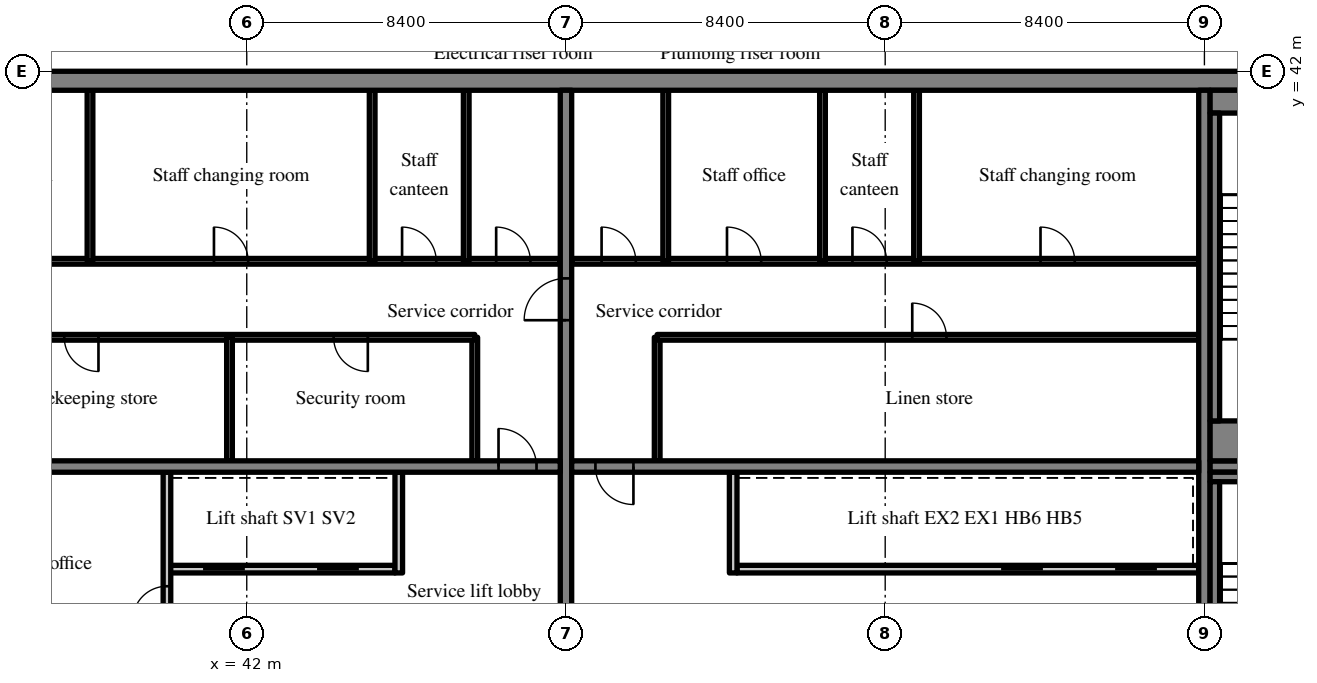
"""IFC4 building model, lengths in metres.
Left out: names, types, materials, properties, quantities, classifications, styles, units other than length and angle.
Written with IfcOpenShell. Run it as: python <this file> out.ifc"""

import sys

from ifc_helpers import new_model, si_unit, direction, frame, frame_2d, origin, place, context, subcontext, project, spatial, rectangle, extrude, source, transform, mapped, element, fill, save


model = new_model("IFC4")
c1 = context("Model", 3, precision=1e-05, world=origin(), true_north=direction((0.0, 1.0)))
c2 = subcontext(c1, "Body", "Model", "MODEL_VIEW")
j1 = project(units=[si_unit("LENGTHUNIT", "METRE"), si_unit("PLANEANGLEUNIT", "RADIAN")], contexts=[c1])
p1 = place(None, origin())
s1 = spatial("IfcSite", under=j1, at=p1, CompositionType="ELEMENT")
p2 = place(p1, origin())
s2 = spatial("IfcBuilding", under=s1, at=p2, CompositionType="ELEMENT")
p3 = place(p2, frame((0.0, 0.0, 301.7)))
s3 = spatial("IfcBuildingStorey", under=s2, at=p3, CompositionType="ELEMENT", Elevation=301.7)
m1 = source(origin(), c2, "Body", "SweptSolid", [
    extrude(rectangle(XDim=50.4, YDim=0.5, at=frame_2d((25.2, 0.0))), origin(), (0.0, 0.0, 1.0), 3.72),
])
p4 = place(p3, frame((25.2, 41.75, 0.0), z_axis=(0.0, 0.0, 1.0), x_axis=(1.0, 0.0, 0.0)))
e1 = element("IfcWall", 1, at=p4, inside=s3, PredefinedType="SHEAR", context=c2, shape_type="MappedRepresentation", body=[
    mapped(m1, transform((0.0, 0.0, 0.0), scale=1.0)),
])
m2 = source(origin(), c2, "Body", "SweptSolid", [
    extrude(rectangle(XDim=19.0, YDim=0.3, at=frame_2d((9.5, 0.0))), origin(), (0.0, 0.0, 1.0), 3.72),
])
p5 = place(p3, frame((50.4, 22.5, 0.0), z_axis=(0.0, 0.0, 1.0), x_axis=(0.0, 1.0, 0.0)))
e2 = element("IfcWall", 2, at=p5, inside=s3, PredefinedType="SHEAR", context=c2, shape_type="MappedRepresentation", body=[
    mapped(m2, transform((0.0, 0.0, 0.0), scale=1.0)),
])
m3 = source(origin(), c2, "Body", "SweptSolid", [
    extrude(rectangle(XDim=1.1, YDim=2.1, at=frame_2d((0.55, 1.05))), frame((0.0, 0.16, 0.0), z_axis=(0.0, -1.0, 0.0), x_axis=(1.0, 0.0, 0.0)), (0.0, 0.0, 1.0), 0.32),
])
p6 = place(p5, frame((12.95, 0.0, 0.0)))
e3 = element("IfcOpeningElement", 3, at=p6, cuts=e2, PredefinedType="OPENING", context=c2, shape_type="MappedRepresentation", body=[
    mapped(m3, transform((0.0, 0.0, 0.0), scale=1.0)),
])
p7 = place(p3, frame((67.2, 22.5, 0.0), z_axis=(0.0, 0.0, 1.0), x_axis=(0.0, 1.0, 0.0)))
e4 = element("IfcWall", 4, at=p7, inside=s3, PredefinedType="SHEAR", context=c2, shape_type="MappedRepresentation", body=[
    mapped(m2, transform((0.0, 0.0, 0.0), scale=1.0)),
])
m4 = source(origin(), c2, "Body", "SweptSolid", [
    extrude(rectangle(XDim=16.5, YDim=0.3, at=frame_2d((8.25, 0.0))), origin(), (0.0, 0.0, 1.0), 3.72),
])
p8 = place(p3, frame((33.75, 31.6, 0.0), z_axis=(0.0, 0.0, 1.0), x_axis=(1.0, 0.0, 0.0)))
e5 = element("IfcWall", 5, at=p8, inside=s3, PredefinedType="SHEAR", context=c2, shape_type="MappedRepresentation", body=[
    mapped(m4, transform((0.0, 0.0, 0.0), scale=1.0)),
])
m5 = source(origin(), c2, "Body", "SweptSolid", [
    extrude(rectangle(XDim=1.0, YDim=2.1, at=frame_2d((0.5, 1.05))), frame((0.0, 0.16, 0.0), z_axis=(0.0, -1.0, 0.0), x_axis=(1.0, 0.0, 0.0)), (0.0, 0.0, 1.0), 0.32),
])
p9 = place(p8, frame((14.875, 0.0, 0.0)))
e6 = element("IfcOpeningElement", 6, at=p9, cuts=e5, PredefinedType="OPENING", context=c2, shape_type="MappedRepresentation", body=[
    mapped(m5, transform((0.0, 0.0, 0.0), scale=1.0)),
])
p10 = place(p3, frame((50.55, 31.6, 0.0), z_axis=(0.0, 0.0, 1.0), x_axis=(1.0, 0.0, 0.0)))
e7 = element("IfcWall", 7, at=p10, inside=s3, PredefinedType="SHEAR", context=c2, shape_type="MappedRepresentation", body=[
    mapped(m4, transform((0.0, 0.0, 0.0), scale=1.0)),
])
p11 = place(p10, frame((0.625, 0.0, 0.0)))
e8 = element("IfcOpeningElement", 8, at=p11, cuts=e7, PredefinedType="OPENING", context=c2, shape_type="MappedRepresentation", body=[
    mapped(m5, transform((0.0, 0.0, 0.0), scale=1.0)),
])
m6 = source(origin(), c2, "Body", "SweptSolid", [
    extrude(rectangle(XDim=7.75, YDim=0.3, at=frame_2d((3.875, 0.0))), origin(), (0.0, 0.0, 1.0), 3.72),
])
p12 = place(p3, frame((67.35, 31.6, 0.0), z_axis=(0.0, 0.0, 1.0), x_axis=(1.0, 0.0, 0.0)))
e9 = element("IfcWall", 9, at=p12, inside=s3, PredefinedType="SHEAR", context=c2, shape_type="MappedRepresentation", body=[
    mapped(m6, transform((0.0, 0.0, 0.0), scale=1.0)),
])
p13 = place(p12, frame((5.875, 0.0, 0.0)))
e10 = element("IfcOpeningElement", 10, at=p13, cuts=e9, PredefinedType="OPENING", context=c2, shape_type="MappedRepresentation", body=[
    mapped(m3, transform((0.0, 0.0, 0.0), scale=1.0)),
])
m7 = source(origin(), c2, "Body", "SweptSolid", [
    extrude(rectangle(XDim=6.0, YDim=0.2, at=frame_2d((3.0, 0.0))), origin(), (0.0, 0.0, 1.0), 3.72),
])
p14 = place(p3, frame((39.9, 28.9, 0.0), z_axis=(0.0, 0.0, 1.0), x_axis=(1.0, 0.0, 0.0)))
e11 = element("IfcWall", 11, at=p14, inside=s3, PredefinedType="SOLIDWALL", context=c2, shape_type="MappedRepresentation", body=[
    mapped(m7, transform((0.0, 0.0, 0.0), scale=1.0)),
])
m8 = source(origin(), c2, "Body", "SweptSolid", [
    extrude(rectangle(XDim=1.1, YDim=2.1, at=frame_2d((0.55, 1.05))), frame((0.0, 0.11, 0.0), z_axis=(0.0, -1.0, 0.0), x_axis=(1.0, 0.0, 0.0)), (0.0, 0.0, 1.0), 0.22),
])
p15 = place(p14, frame((0.95, 0.0, 0.0)))
e12 = element("IfcOpeningElement", 12, at=p15, cuts=e11, PredefinedType="OPENING", context=c2, shape_type="MappedRepresentation", body=[
    mapped(m8, transform((0.0, 0.0, 0.0), scale=1.0)),
])
p16 = place(p14, frame((3.95, 0.0, 0.0)))
e13 = element("IfcOpeningElement", 13, at=p16, cuts=e11, PredefinedType="OPENING", context=c2, shape_type="MappedRepresentation", body=[
    mapped(m8, transform((0.0, 0.0, 0.0), scale=1.0)),
])
m9 = source(origin(), c2, "Body", "SweptSolid", [
    extrude(rectangle(XDim=8.95, YDim=0.2, at=frame_2d((4.475, 0.0))), origin(), (0.0, 0.0, 1.0), 3.72),
])
p17 = place(p3, frame((39.9, 22.5, 0.0), z_axis=(0.0, 0.0, 1.0), x_axis=(0.0, 1.0, 0.0)))
e14 = element("IfcWall", 14, at=p17, inside=s3, PredefinedType="PARTITIONING", context=c2, shape_type="MappedRepresentation", body=[
    mapped(m9, transform((0.0, 0.0, 0.0), scale=1.0)),
])
m10 = source(origin(), c2, "Body", "SweptSolid", [
    extrude(rectangle(XDim=0.9, YDim=2.1, at=frame_2d((0.45, 1.05))), frame((0.0, 0.11, 0.0), z_axis=(0.0, -1.0, 0.0), x_axis=(1.0, 0.0, 0.0)), (0.0, 0.0, 1.0), 0.22),
])
p18 = place(p17, frame((5.05, 0.0, 0.0)))
e15 = element("IfcOpeningElement", 15, at=p18, cuts=e14, PredefinedType="OPENING", context=c2, shape_type="MappedRepresentation", body=[
    mapped(m10, transform((0.0, 0.0, 0.0), scale=1.0)),
])
m11 = source(origin(), c2, "Body", "SweptSolid", [
    extrude(rectangle(XDim=2.65, YDim=0.2, at=frame_2d((1.325, 0.0))), origin(), (0.0, 0.0, 1.0), 3.72),
])
p19 = place(p3, frame((46.0, 28.8, 0.0), z_axis=(0.0, 0.0, 1.0), x_axis=(0.0, 1.0, 0.0)))
e16 = element("IfcWall", 16, at=p19, inside=s3, PredefinedType="SOLIDWALL", context=c2, shape_type="MappedRepresentation", body=[
    mapped(m11, transform((0.0, 0.0, 0.0), scale=1.0)),
])
m12 = source(origin(), c2, "Body", "SweptSolid", [
    extrude(rectangle(XDim=3.25, YDim=0.15, at=frame_2d((1.625, 0.0))), origin(), (0.0, 0.0, 1.0), 3.72),
])
p20 = place(p3, frame((48.0, 31.75, 0.0), z_axis=(0.0, 0.0, 1.0), x_axis=(0.0, 1.0, 0.0)))
e17 = element("IfcWall", 17, at=p20, inside=s3, PredefinedType="PARTITIONING", context=c2, shape_type="MappedRepresentation", body=[
    mapped(m12, transform((0.0, 0.0, 0.0), scale=1.0)),
])
m13 = source(origin(), c2, "Body", "SweptSolid", [
    extrude(rectangle(XDim=14.25, YDim=0.15, at=frame_2d((7.125, 0.0))), origin(), (0.0, 0.0, 1.0), 3.72),
])
p21 = place(p3, frame((33.75, 35.0, 0.0), z_axis=(0.0, 0.0, 1.0), x_axis=(1.0, 0.0, 0.0)))
e18 = element("IfcWall", 18, at=p21, inside=s3, PredefinedType="PARTITIONING", context=c2, shape_type="MappedRepresentation", body=[
    mapped(m13, transform((0.0, 0.0, 0.0), scale=1.0)),
])
m14 = source(origin(), c2, "Body", "SweptSolid", [
    extrude(rectangle(XDim=0.9, YDim=2.1, at=frame_2d((0.45, 1.05))), frame((0.0, 0.085, 0.0), z_axis=(0.0, -1.0, 0.0), x_axis=(1.0, 0.0, 0.0)), (0.0, 0.0, 1.0), 0.17),
])
p22 = place(p21, frame((3.448, 0.0, 0.0)))
e19 = element("IfcOpeningElement", 19, at=p22, cuts=e18, PredefinedType="OPENING", context=c2, shape_type="MappedRepresentation", body=[
    mapped(m14, transform((0.0, 0.0, 0.0), scale=1.0)),
])
p23 = place(p21, frame((10.536, 0.0, 0.0)))
e20 = element("IfcOpeningElement", 20, at=p23, cuts=e18, PredefinedType="OPENING", context=c2, shape_type="MappedRepresentation", body=[
    mapped(m14, transform((0.0, 0.0, 0.0), scale=1.0)),
])
m15 = source(origin(), c2, "Body", "SweptSolid", [
    extrude(rectangle(XDim=16.5, YDim=0.15, at=frame_2d((8.25, 0.0))), origin(), (0.0, 0.0, 1.0), 3.72),
])
p24 = place(p3, frame((33.75, 37.0, 0.0), z_axis=(0.0, 0.0, 1.0), x_axis=(1.0, 0.0, 0.0)))
e21 = element("IfcWall", 21, at=p24, inside=s3, PredefinedType="PARTITIONING", context=c2, shape_type="MappedRepresentation", body=[
    mapped(m15, transform((0.0, 0.0, 0.0), scale=1.0)),
])
p25 = place(p24, frame((1.612, 0.0, 0.0)))
e22 = element("IfcOpeningElement", 22, at=p25, cuts=e21, PredefinedType="OPENING", context=c2, shape_type="MappedRepresentation", body=[
    mapped(m14, transform((0.0, 0.0, 0.0), scale=1.0)),
])
p26 = place(p24, frame((7.387, 0.0, 0.0)))
e23 = element("IfcOpeningElement", 23, at=p26, cuts=e21, PredefinedType="OPENING", context=c2, shape_type="MappedRepresentation", body=[
    mapped(m14, transform((0.0, 0.0, 0.0), scale=1.0)),
])
p27 = place(p24, frame((12.337, 0.0, 0.0)))
e24 = element("IfcOpeningElement", 24, at=p27, cuts=e21, PredefinedType="OPENING", context=c2, shape_type="MappedRepresentation", body=[
    mapped(m14, transform((0.0, 0.0, 0.0), scale=1.0)),
])
p28 = place(p24, frame((14.813, 0.0, 0.0)))
e25 = element("IfcOpeningElement", 25, at=p28, cuts=e21, PredefinedType="OPENING", context=c2, shape_type="MappedRepresentation", body=[
    mapped(m14, transform((0.0, 0.0, 0.0), scale=1.0)),
])
p29 = place(p3, frame((41.546, 31.75, 0.0), z_axis=(0.0, 0.0, 1.0), x_axis=(0.0, 1.0, 0.0)))
e26 = element("IfcWall", 26, at=p29, inside=s3, PredefinedType="PARTITIONING", context=c2, shape_type="MappedRepresentation", body=[
    mapped(m12, transform((0.0, 0.0, 0.0), scale=1.0)),
])
m16 = source(origin(), c2, "Body", "SweptSolid", [
    extrude(rectangle(XDim=4.5, YDim=0.15, at=frame_2d((2.25, 0.0))), origin(), (0.0, 0.0, 1.0), 3.72),
])
for number, where, z_axis, x_axis in (
    (27, (37.875, 37.0, 0.0), (0.0, 0.0, 1.0), (0.0, 1.0, 0.0)),
    (28, (45.3, 37.0, 0.0), (0.0, 0.0, 1.0), (0.0, 1.0, 0.0)),
    (29, (47.775, 37.0, 0.0), (0.0, 0.0, 1.0), (0.0, 1.0, 0.0)),
):
    element("IfcWall", number, at=place(p3, frame(where, z_axis=z_axis, x_axis=x_axis)), inside=s3, PredefinedType="PARTITIONING", context=c2, shape_type="MappedRepresentation", body=[
        mapped(m16, transform((0.0, 0.0, 0.0), scale=1.0)),
    ])
m17 = source(origin(), c2, "Body", "SweptSolid", [
    extrude(rectangle(XDim=12.15, YDim=0.2, at=frame_2d((6.075, 0.0))), origin(), (0.0, 0.0, 1.0), 3.72),
])
p30 = place(p3, frame((67.05, 28.9, 0.0), z_axis=(0.0, 0.0, 1.0), x_axis=(-1.0, 0.0, 0.0)))
e30 = element("IfcWall", 30, at=p30, inside=s3, PredefinedType="SOLIDWALL", context=c2, shape_type="MappedRepresentation", body=[
    mapped(m17, transform((0.0, 0.0, 0.0), scale=1.0)),
])
p31 = place(p30, frame((1.1, 0.0, 0.0)))
e31 = element("IfcOpeningElement", 31, at=p31, cuts=e30, PredefinedType="OPENING", context=c2, shape_type="MappedRepresentation", body=[
    mapped(m8, transform((0.0, 0.0, 0.0), scale=1.0)),
])
p32 = place(p30, frame((4.1, 0.0, 0.0)))
e32 = element("IfcOpeningElement", 32, at=p32, cuts=e30, PredefinedType="OPENING", context=c2, shape_type="MappedRepresentation", body=[
    mapped(m8, transform((0.0, 0.0, 0.0), scale=1.0)),
])
p33 = place(p3, frame((54.8, 28.8, 0.0), z_axis=(0.0, 0.0, 1.0), x_axis=(0.0, 1.0, 0.0)))
e33 = element("IfcWall", 33, at=p33, inside=s3, PredefinedType="SOLIDWALL", context=c2, shape_type="MappedRepresentation", body=[
    mapped(m11, transform((0.0, 0.0, 0.0), scale=1.0)),
])
p34 = place(p3, frame((52.8, 31.75, 0.0), z_axis=(0.0, 0.0, 1.0), x_axis=(0.0, 1.0, 0.0)))
e34 = element("IfcWall", 34, at=p34, inside=s3, PredefinedType="PARTITIONING", context=c2, shape_type="MappedRepresentation", body=[
    mapped(m12, transform((0.0, 0.0, 0.0), scale=1.0)),
])
p35 = place(p3, frame((67.05, 35.0, 0.0), z_axis=(0.0, 0.0, 1.0), x_axis=(-1.0, 0.0, 0.0)))
e35 = element("IfcWall", 35, at=p35, inside=s3, PredefinedType="PARTITIONING", context=c2, shape_type="MappedRepresentation", body=[
    mapped(m13, transform((0.0, 0.0, 0.0), scale=1.0)),
])
p36 = place(p35, frame((6.638, 0.0, 0.0)))
e36 = element("IfcOpeningElement", 36, at=p36, cuts=e35, PredefinedType="OPENING", context=c2, shape_type="MappedRepresentation", body=[
    mapped(m14, transform((0.0, 0.0, 0.0), scale=1.0)),
])
p37 = place(p3, frame((67.05, 37.0, 0.0), z_axis=(0.0, 0.0, 1.0), x_axis=(-1.0, 0.0, 0.0)))
e37 = element("IfcWall", 37, at=p37, inside=s3, PredefinedType="PARTITIONING", context=c2, shape_type="MappedRepresentation", body=[
    mapped(m15, transform((0.0, 0.0, 0.0), scale=1.0)),
])
p38 = place(p37, frame((3.263, 0.0, 0.0)))
e38 = element("IfcOpeningElement", 38, at=p38, cuts=e37, PredefinedType="OPENING", context=c2, shape_type="MappedRepresentation", body=[
    mapped(m14, transform((0.0, 0.0, 0.0), scale=1.0)),
])
p39 = place(p37, frame((8.212, 0.0, 0.0)))
e39 = element("IfcOpeningElement", 39, at=p39, cuts=e37, PredefinedType="OPENING", context=c2, shape_type="MappedRepresentation", body=[
    mapped(m14, transform((0.0, 0.0, 0.0), scale=1.0)),
])
p40 = place(p37, frame((11.513, 0.0, 0.0)))
e40 = element("IfcOpeningElement", 40, at=p40, cuts=e37, PredefinedType="OPENING", context=c2, shape_type="MappedRepresentation", body=[
    mapped(m14, transform((0.0, 0.0, 0.0), scale=1.0)),
])
p41 = place(p37, frame((14.813, 0.0, 0.0)))
e41 = element("IfcOpeningElement", 41, at=p41, cuts=e37, PredefinedType="OPENING", context=c2, shape_type="MappedRepresentation", body=[
    mapped(m14, transform((0.0, 0.0, 0.0), scale=1.0)),
])
for number, where, z_axis, x_axis in (
    (42, (59.625, 37.0, 0.0), (0.0, 0.0, 1.0), (0.0, 1.0, 0.0)),
    (43, (57.15, 37.0, 0.0), (0.0, 0.0, 1.0), (0.0, 1.0, 0.0)),
    (44, (53.025, 37.0, 0.0), (0.0, 0.0, 1.0), (0.0, 1.0, 0.0)),
):
    element("IfcWall", number, at=place(p3, frame(where, z_axis=z_axis, x_axis=x_axis)), inside=s3, PredefinedType="PARTITIONING", context=c2, shape_type="MappedRepresentation", body=[
        mapped(m16, transform((0.0, 0.0, 0.0), scale=1.0)),
    ])
m18 = source(origin(), c2, "Body", "SweptSolid", [
    extrude(rectangle(XDim=4.9, YDim=0.25, at=frame_2d((2.45, 0.0))), origin(), (0.0, 0.0, 1.0), 3.72),
])
p42 = place(p3, frame((67.35, 31.325, 0.0), z_axis=(0.0, 0.0, 1.0), x_axis=(1.0, 0.0, 0.0)))
e45 = element("IfcWall", 45, at=p42, inside=s3, PredefinedType="SOLIDWALL", context=c2, shape_type="MappedRepresentation", body=[
    mapped(m18, transform((0.0, 0.0, 0.0), scale=1.0)),
])
m19 = source(origin(), c2, "Body", "SweptSolid", [
    extrude(rectangle(XDim=8.1, YDim=0.25, at=frame_2d((4.05, 0.0))), origin(), (0.0, 0.0, 1.0), 3.72),
])
p43 = place(p3, frame((67.475, 23.1, 0.0), z_axis=(0.0, 0.0, 1.0), x_axis=(0.0, 1.0, 0.0)))
e46 = element("IfcWall", 46, at=p43, inside=s3, PredefinedType="SOLIDWALL", context=c2, shape_type="MappedRepresentation", body=[
    mapped(m19, transform((0.0, 0.0, 0.0), scale=1.0)),
])
m20 = source(origin(), c2, "Body", "SweptSolid", [
    extrude(rectangle(XDim=4.9, YDim=0.6, at=frame_2d((2.45, 0.0))), origin(), (0.0, 0.0, 1.0), 3.72),
])
p44 = place(p3, frame((67.35, 41.2, 0.0), z_axis=(0.0, 0.0, 1.0), x_axis=(1.0, 0.0, 0.0)))
e47 = element("IfcWall", 47, at=p44, inside=s3, PredefinedType="SOLIDWALL", context=c2, shape_type="MappedRepresentation", body=[
    mapped(m20, transform((0.0, 0.0, 0.0), scale=1.0)),
])
m21 = source(origin(), c2, "Body", "SweptSolid", [
    extrude(rectangle(XDim=4.9, YDim=1.05, at=frame_2d((2.45, 0.0))), origin(), (0.0, 0.0, 1.0), 3.72),
])
p45 = place(p3, frame((67.35, 32.275, 0.0), z_axis=(0.0, 0.0, 1.0), x_axis=(1.0, 0.0, 0.0)))
e48 = element("IfcWall", 48, at=p45, inside=s3, PredefinedType="SOLIDWALL", context=c2, shape_type="MappedRepresentation", body=[
    mapped(m21, transform((0.0, 0.0, 0.0), scale=1.0)),
])
p46 = place(p3, frame((67.475, 32.8, 0.0), z_axis=(0.0, 0.0, 1.0), x_axis=(0.0, 1.0, 0.0)))
e49 = element("IfcWall", 49, at=p46, inside=s3, PredefinedType="SOLIDWALL", context=c2, shape_type="MappedRepresentation", body=[
    mapped(m19, transform((0.0, 0.0, 0.0), scale=1.0)),
])
m22 = source(origin(), c2, "Body", "SweptSolid", [
    extrude(rectangle(XDim=1.0, YDim=2.1, at=frame_2d((0.5, 1.05))), frame((0.0, 0.025, 0.0), z_axis=(0.0, -1.0, 0.0), x_axis=(1.0, 0.0, 0.0)), (0.0, 0.0, 1.0), 0.05),
])
p47 = place(p9, origin())
e50 = element("IfcDoor", 50, at=p47, inside=s3, OperationType="SINGLE_SWING_LEFT", PredefinedType="DOOR", context=c2, shape_type="MappedRepresentation", body=[
    mapped(m22, transform((0.0, 0.0, 0.0), scale=1.0)),
])
fill(e6, e50)
m23 = source(origin(), c2, "Body", "SweptSolid", [
    extrude(rectangle(XDim=1.1, YDim=2.1, at=frame_2d((0.55, 1.05))), frame((0.0, 0.025, 0.0), z_axis=(0.0, -1.0, 0.0), x_axis=(1.0, 0.0, 0.0)), (0.0, 0.0, 1.0), 0.05),
])
p48 = place(p15, origin())
e51 = element("IfcDoor", 51, at=p48, inside=s3, OperationType="SLIDING_TO_LEFT", PredefinedType="DOOR", context=c2, shape_type="MappedRepresentation", body=[
    mapped(m23, transform((0.0, 0.0, 0.0), scale=1.0)),
])
fill(e12, e51)
p49 = place(p16, origin())
e52 = element("IfcDoor", 52, at=p49, inside=s3, OperationType="SLIDING_TO_RIGHT", PredefinedType="DOOR", context=c2, shape_type="MappedRepresentation", body=[
    mapped(m23, transform((0.0, 0.0, 0.0), scale=1.0)),
])
fill(e13, e52)
m24 = source(origin(), c2, "Body", "SweptSolid", [
    extrude(rectangle(XDim=0.9, YDim=2.1, at=frame_2d((0.45, 1.05))), frame((0.0, 0.025, 0.0), z_axis=(0.0, -1.0, 0.0), x_axis=(1.0, 0.0, 0.0)), (0.0, 0.0, 1.0), 0.05),
])
p50 = place(p18, origin())
e53 = element("IfcDoor", 53, at=p50, inside=s3, OperationType="SINGLE_SWING_LEFT", PredefinedType="DOOR", context=c2, shape_type="MappedRepresentation", body=[
    mapped(m24, transform((0.0, 0.0, 0.0), scale=1.0)),
])
fill(e15, e53)
p51 = place(p22, origin())
e54 = element("IfcDoor", 54, at=p51, inside=s3, OperationType="SINGLE_SWING_RIGHT", PredefinedType="DOOR", context=c2, shape_type="MappedRepresentation", body=[
    mapped(m24, transform((0.0, 0.0, 0.0), scale=1.0)),
])
fill(e19, e54)
p52 = place(p23, origin())
e55 = element("IfcDoor", 55, at=p52, inside=s3, OperationType="SINGLE_SWING_RIGHT", PredefinedType="DOOR", context=c2, shape_type="MappedRepresentation", body=[
    mapped(m24, transform((0.0, 0.0, 0.0), scale=1.0)),
])
fill(e20, e55)
p53 = place(p26, origin())
e56 = element("IfcDoor", 56, at=p53, inside=s3, OperationType="SINGLE_SWING_LEFT", PredefinedType="DOOR", context=c2, shape_type="MappedRepresentation", body=[
    mapped(m24, transform((0.0, 0.0, 0.0), scale=1.0)),
])
fill(e23, e56)
p54 = place(p27, origin())
e57 = element("IfcDoor", 57, at=p54, inside=s3, OperationType="SINGLE_SWING_LEFT", PredefinedType="DOOR", context=c2, shape_type="MappedRepresentation", body=[
    mapped(m24, transform((0.0, 0.0, 0.0), scale=1.0)),
])
fill(e24, e57)
p55 = place(p28, origin())
e58 = element("IfcDoor", 58, at=p55, inside=s3, OperationType="SINGLE_SWING_LEFT", PredefinedType="DOOR", context=c2, shape_type="MappedRepresentation", body=[
    mapped(m24, transform((0.0, 0.0, 0.0), scale=1.0)),
])
fill(e25, e58)
p56 = place(p11, origin())
e59 = element("IfcDoor", 59, at=p56, inside=s3, OperationType="SINGLE_SWING_RIGHT", PredefinedType="DOOR", context=c2, shape_type="MappedRepresentation", body=[
    mapped(m22, transform((0.0, 0.0, 0.0), scale=1.0)),
])
fill(e8, e59)
p57 = place(p31, origin())
e60 = element("IfcDoor", 60, at=p57, inside=s3, OperationType="SLIDING_TO_RIGHT", PredefinedType="DOOR", context=c2, shape_type="MappedRepresentation", body=[
    mapped(m23, transform((0.0, 0.0, 0.0), scale=1.0)),
])
fill(e31, e60)
p58 = place(p32, origin())
e61 = element("IfcDoor", 61, at=p58, inside=s3, OperationType="SLIDING_TO_LEFT", PredefinedType="DOOR", context=c2, shape_type="MappedRepresentation", body=[
    mapped(m23, transform((0.0, 0.0, 0.0), scale=1.0)),
])
fill(e32, e61)
p59 = place(p36, origin())
e62 = element("IfcDoor", 62, at=p59, inside=s3, OperationType="SINGLE_SWING_RIGHT", PredefinedType="DOOR", context=c2, shape_type="MappedRepresentation", body=[
    mapped(m24, transform((0.0, 0.0, 0.0), scale=1.0)),
])
fill(e36, e62)
p60 = place(p38, origin())
e63 = element("IfcDoor", 63, at=p60, inside=s3, OperationType="SINGLE_SWING_RIGHT", PredefinedType="DOOR", context=c2, shape_type="MappedRepresentation", body=[
    mapped(m24, transform((0.0, 0.0, 0.0), scale=1.0)),
])
fill(e38, e63)
p61 = place(p39, origin())
e64 = element("IfcDoor", 64, at=p61, inside=s3, OperationType="SINGLE_SWING_RIGHT", PredefinedType="DOOR", context=c2, shape_type="MappedRepresentation", body=[
    mapped(m24, transform((0.0, 0.0, 0.0), scale=1.0)),
])
fill(e39, e64)
p62 = place(p40, origin())
e65 = element("IfcDoor", 65, at=p62, inside=s3, OperationType="SINGLE_SWING_RIGHT", PredefinedType="DOOR", context=c2, shape_type="MappedRepresentation", body=[
    mapped(m24, transform((0.0, 0.0, 0.0), scale=1.0)),
])
fill(e40, e65)
p63 = place(p41, origin())
e66 = element("IfcDoor", 66, at=p63, inside=s3, OperationType="SINGLE_SWING_RIGHT", PredefinedType="DOOR", context=c2, shape_type="MappedRepresentation", body=[
    mapped(m24, transform((0.0, 0.0, 0.0), scale=1.0)),
])
fill(e41, e66)
p64 = place(p6, origin())
e67 = element("IfcDoor", 67, at=p64, inside=s3, OperationType="SINGLE_SWING_LEFT", PredefinedType="DOOR", context=c2, shape_type="MappedRepresentation", body=[
    mapped(m23, transform((0.0, 0.0, 0.0), scale=1.0)),
])
fill(e3, e67)
save(model, sys.argv[1])
